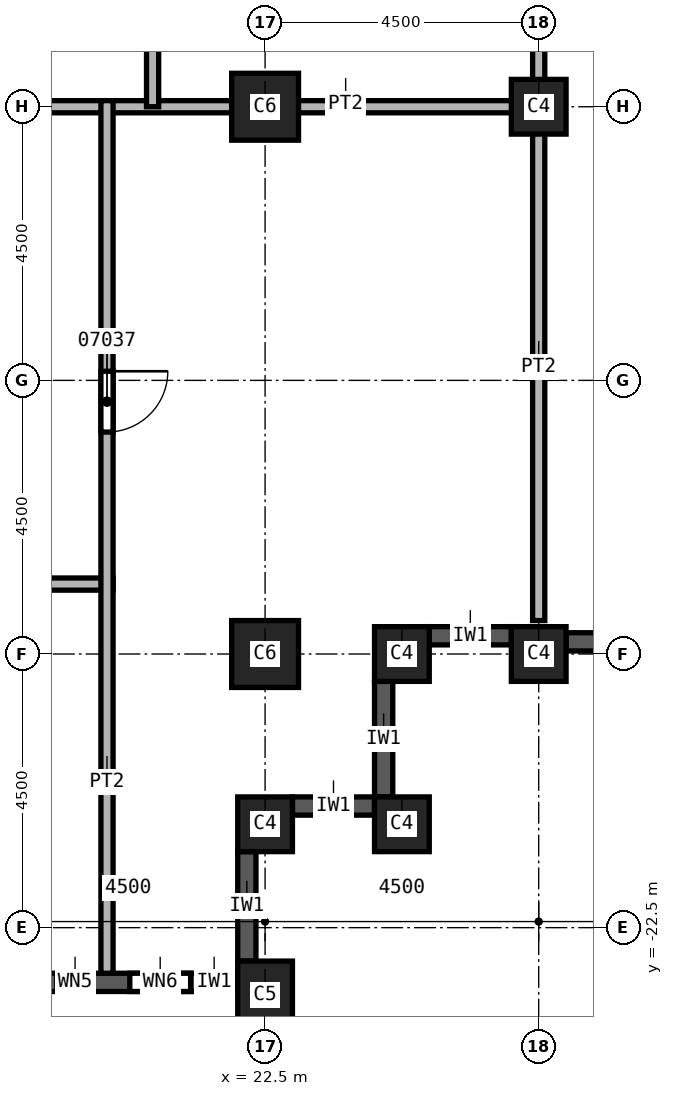
"""IFC4 building model, lengths in metres.
Left out: names, types, materials, properties, quantities, classifications, styles, units other than length and angle.
Written with IfcOpenShell. Run it as: python <this file> out.ifc"""

import sys

from ifc_helpers import new_model, si_unit, direction, frame, frame_2d, origin, origin_2d, place, context, subcontext, project, spatial, rectangle, extrude, element, fill, save


model = new_model("IFC4")
c1 = context("Model", 3, precision=1e-05, world=origin(), true_north=direction((0.0, 1.0)))
c2 = subcontext(c1, "Body", "Model", "MODEL_VIEW")
j1 = project(units=[si_unit("LENGTHUNIT", "METRE"), si_unit("PLANEANGLEUNIT", "RADIAN")], contexts=[c1])
p1 = place(None, origin())
s1 = spatial("IfcSite", under=j1, at=p1, CompositionType="ELEMENT")
p2 = place(p1, origin())
s2 = spatial("IfcBuilding", under=s1, at=p2, CompositionType="ELEMENT")
p3 = place(p2, frame((0.0, 0.0, 138.0)))
s3 = spatial("IfcBuildingStorey", under=s2, at=p3, CompositionType="ELEMENT", Elevation=138.0)
for number, where, z_axis, x_axis in (
    (1, (22.5, -9.0, 0.0), (0.0, 0.0, 1.0), (1.0, 0.0, 0.0)),
    (2, (22.5, -18.0, 0.0), (0.0, 0.0, 1.0), (1.0, 0.0, 0.0)),
):
    element("IfcColumn", number, at=place(p3, frame(where, z_axis=z_axis, x_axis=x_axis)), inside=s3, PredefinedType="COLUMN", context=c2, shape_type="SweptSolid", body=[
        extrude(rectangle(XDim=1.1, YDim=1.1, at=origin_2d()), origin(), (0.0, 0.0, 1.0), 3.7),
    ])
for number, where, z_axis, x_axis in (
    (3, (27.0, -9.0, 0.0), (0.0, 0.0, 1.0), (1.0, 0.0, 0.0)),
    (4, (27.0, -18.0, 0.0), (0.0, 0.0, 1.0), (1.0, 0.0, 0.0)),
):
    element("IfcColumn", number, at=place(p3, frame(where, z_axis=z_axis, x_axis=x_axis)), inside=s3, PredefinedType="COLUMN", context=c2, shape_type="SweptSolid", body=[
        extrude(rectangle(XDim=0.9, YDim=0.9, at=origin_2d()), origin(), (0.0, 0.0, 1.0), 3.7),
    ])
p4 = place(p3, frame((22.5, -23.6, 0.0), z_axis=(0.0, 0.0, 1.0), x_axis=(1.0, 0.0, 0.0)))
e5 = element("IfcColumn", 5, at=p4, inside=s3, PredefinedType="COLUMN", context=c2, shape_type="SweptSolid", body=[
    extrude(rectangle(XDim=0.9, YDim=1.1, at=origin_2d()), origin(), (0.0, 0.0, 1.0), 3.7),
])
for number, where, z_axis, x_axis in (
    (6, (22.5, -20.8, 0.0), (0.0, 0.0, 1.0), (1.0, 0.0, 0.0)),
    (7, (24.75, -20.8, 0.0), (0.0, 0.0, 1.0), (1.0, 0.0, 0.0)),
    (8, (24.75, -18.0, 0.0), (0.0, 0.0, 1.0), (1.0, 0.0, 0.0)),
):
    element("IfcColumn", number, at=place(p3, frame(where, z_axis=z_axis, x_axis=x_axis)), inside=s3, PredefinedType="COLUMN", context=c2, shape_type="SweptSolid", body=[
        extrude(rectangle(XDim=0.9, YDim=0.9, at=origin_2d()), origin(), (0.0, 0.0, 1.0), 3.7),
    ])
p5 = place(p3, frame((18.45, -23.4, 0.0), z_axis=(0.0, 0.0, 1.0), x_axis=(1.0, 0.0, 0.0)))
e9 = element("IfcWall", 9, at=p5, inside=s3, PredefinedType="SOLIDWALL", context=c2, shape_type="SweptSolid", body=[
    extrude(rectangle(XDim=3.6, YDim=0.3, at=frame_2d((1.8, 0.0))), origin(), (0.0, 0.0, 1.0), 3.1),
])
p6 = place(p5, frame((0.625, 0.0, 0.8)))
e10 = element("IfcOpeningElement", 10, at=p6, cuts=e9, PredefinedType="OPENING", context=c2, shape_type="SweptSolid", body=[
    extrude(rectangle(XDim=0.6, YDim=1.95, at=frame_2d((0.3, 0.975))), frame((0.0, 0.15, 0.0), z_axis=(0.0, -1.0, 0.0), x_axis=(1.0, 0.0, 0.0)), (0.0, 0.0, 1.0), 0.3),
])
p7 = place(p5, frame((1.825, 0.0, 0.8)))
e11 = element("IfcOpeningElement", 11, at=p7, cuts=e9, PredefinedType="OPENING", context=c2, shape_type="SweptSolid", body=[
    extrude(rectangle(XDim=1.0, YDim=1.95, at=frame_2d((0.5, 0.975))), frame((0.0, 0.15, 0.0), z_axis=(0.0, -1.0, 0.0), x_axis=(1.0, 0.0, 0.0)), (0.0, 0.0, 1.0), 0.3),
])
p8 = place(p3, frame((22.2, -23.05, 0.0), z_axis=(0.0, 0.0, 1.0), x_axis=(0.0, 1.0, 0.0)))
e12 = element("IfcWall", 12, at=p8, inside=s3, PredefinedType="SOLIDWALL", context=c2, shape_type="SweptSolid", body=[
    extrude(rectangle(XDim=1.8, YDim=0.3, at=frame_2d((0.9, 0.0))), origin(), (0.0, 0.0, 1.0), 3.1),
])
p9 = place(p3, frame((22.95, -20.5, 0.0), z_axis=(0.0, 0.0, 1.0), x_axis=(1.0, 0.0, 0.0)))
e13 = element("IfcWall", 13, at=p9, inside=s3, PredefinedType="SOLIDWALL", context=c2, shape_type="SweptSolid", body=[
    extrude(rectangle(XDim=1.35, YDim=0.3, at=frame_2d((0.675, 0.0))), origin(), (0.0, 0.0, 1.0), 3.1),
])
p10 = place(p3, frame((24.45, -20.35, 0.0), z_axis=(0.0, 0.0, 1.0), x_axis=(0.0, 1.0, 0.0)))
e14 = element("IfcWall", 14, at=p10, inside=s3, PredefinedType="SOLIDWALL", context=c2, shape_type="SweptSolid", body=[
    extrude(rectangle(XDim=1.9, YDim=0.3, at=frame_2d((0.95, 0.0))), origin(), (0.0, 0.0, 1.0), 3.1),
])
p11 = place(p3, frame((25.2, -17.7, 0.0), z_axis=(0.0, 0.0, 1.0), x_axis=(1.0, 0.0, 0.0)))
e15 = element("IfcWall", 15, at=p11, inside=s3, PredefinedType="SOLIDWALL", context=c2, shape_type="SweptSolid", body=[
    extrude(rectangle(XDim=1.35, YDim=0.3, at=frame_2d((0.675, 0.0))), origin(), (0.0, 0.0, 1.0), 3.1),
])
p12 = place(p3, frame((27.45, -17.8, 0.0), z_axis=(0.0, 0.0, 1.0), x_axis=(1.0, 0.0, 0.0)))
e16 = element("IfcWall", 16, at=p12, inside=s3, PredefinedType="SOLIDWALL", context=c2, shape_type="SweptSolid", body=[
    extrude(rectangle(XDim=3.6, YDim=0.3, at=frame_2d((1.8, 0.0))), origin(), (0.0, 0.0, 1.0), 3.1),
])
p13 = place(p12, frame((0.6, 0.0, 0.8)))
e17 = element("IfcOpeningElement", 17, at=p13, cuts=e16, PredefinedType="OPENING", context=c2, shape_type="SweptSolid", body=[
    extrude(rectangle(XDim=2.4, YDim=1.95, at=frame_2d((1.2, 0.975))), frame((0.0, 0.15, 0.0), z_axis=(0.0, -1.0, 0.0), x_axis=(1.0, 0.0, 0.0)), (0.0, 0.0, 1.0), 0.3),
])
p14 = place(p3, frame((15.4, -16.85, 0.0), z_axis=(0.0, 0.0, 1.0), x_axis=(1.0, 0.0, 0.0)))
e18 = element("IfcWall", 18, at=p14, inside=s3, PredefinedType="PARTITIONING", context=c2, shape_type="SweptSolid", body=[
    extrude(rectangle(XDim=4.6, YDim=0.2, at=frame_2d((2.3, 0.0))), origin(), (0.0, 0.0, 1.0), 3.7),
])
p15 = place(p3, frame((15.4, -9.0, 0.0), z_axis=(0.0, 0.0, 1.0), x_axis=(1.0, 0.0, 0.0)))
e19 = element("IfcWall", 19, at=p15, inside=s3, PredefinedType="PARTITIONING", context=c2, shape_type="SweptSolid", body=[
    extrude(rectangle(XDim=11.7, YDim=0.2, at=frame_2d((5.85, 0.0))), origin(), (0.0, 0.0, 1.0), 3.7),
])
p16 = place(p3, frame((19.9, -8.9, 0.0), z_axis=(0.0, 0.0, 1.0), x_axis=(0.0, -1.0, 0.0)))
e20 = element("IfcWall", 20, at=p16, inside=s3, PredefinedType="PARTITIONING", context=c2, shape_type="SweptSolid", body=[
    extrude(rectangle(XDim=14.35, YDim=0.2, at=frame_2d((7.175, 0.0))), origin(), (0.0, 0.0, 1.0), 3.7),
])
p17 = place(p16, frame((4.45, 0.0, 0.0)))
e21 = element("IfcOpeningElement", 21, at=p17, cuts=e20, PredefinedType="OPENING", context=c2, shape_type="SweptSolid", body=[
    extrude(rectangle(XDim=1.0, YDim=2.1, at=frame_2d((0.5, 1.05))), frame((0.0, 0.1, 0.0), z_axis=(0.0, -1.0, 0.0), x_axis=(1.0, 0.0, 0.0)), (0.0, 0.0, 1.0), 0.2),
])
p18 = place(p3, frame((20.65, -3.75, 0.0), z_axis=(0.0, 0.0, 1.0), x_axis=(0.0, -1.0, 0.0)))
e22 = element("IfcWall", 22, at=p18, inside=s3, PredefinedType="PARTITIONING", context=c2, shape_type="SweptSolid", body=[
    extrude(rectangle(XDim=5.25, YDim=0.2, at=frame_2d((2.625, 0.0))), origin(), (0.0, 0.0, 1.0), 3.7),
])
p19 = place(p18, frame((1.3, 0.0, 0.0)))
e23 = element("IfcOpeningElement", 23, at=p19, cuts=e22, PredefinedType="OPENING", context=c2, shape_type="SweptSolid", body=[
    extrude(rectangle(XDim=1.0, YDim=2.1, at=frame_2d((0.5, 1.05))), frame((0.0, 0.1, 0.0), z_axis=(0.0, -1.0, 0.0), x_axis=(1.0, 0.0, 0.0)), (0.0, 0.0, 1.0), 0.2),
])
p20 = place(p3, frame((27.0, -3.75, 0.0), z_axis=(0.0, 0.0, 1.0), x_axis=(0.0, -1.0, 0.0)))
e24 = element("IfcWall", 24, at=p20, inside=s3, PredefinedType="PARTITIONING", context=c2, shape_type="SweptSolid", body=[
    extrude(rectangle(XDim=13.7, YDim=0.2, at=frame_2d((6.85, 0.0))), origin(), (0.0, 0.0, 1.0), 3.7),
])
p21 = place(p17, origin())
e25 = element("IfcDoor", 25, at=p21, inside=s3, OperationType="SINGLE_SWING_RIGHT", PredefinedType="DOOR", context=c2, shape_type="SweptSolid", body=[
    extrude(rectangle(XDim=1.0, YDim=2.1, at=frame_2d((0.5, 1.05))), frame((0.0, 0.025, 0.0), z_axis=(0.0, -1.0, 0.0), x_axis=(1.0, 0.0, 0.0)), (0.0, 0.0, 1.0), 0.05),
])
fill(e21, e25)
p22 = place(p6, origin())
e26 = element("IfcWindow", 26, at=p22, inside=s3, PartitioningType="SINGLE_PANEL", PredefinedType="WINDOW", context=c2, shape_type="SweptSolid", body=[
    extrude(rectangle(XDim=0.6, YDim=1.95, at=frame_2d((0.3, 0.975))), frame((0.0, 0.03, 0.0), z_axis=(0.0, -1.0, 0.0), x_axis=(1.0, 0.0, 0.0)), (0.0, 0.0, 1.0), 0.06),
])
fill(e10, e26)
p23 = place(p7, origin())
e27 = element("IfcWindow", 27, at=p23, inside=s3, PartitioningType="SINGLE_PANEL", PredefinedType="WINDOW", context=c2, shape_type="SweptSolid", body=[
    extrude(rectangle(XDim=1.0, YDim=1.95, at=frame_2d((0.5, 0.975))), frame((0.0, 0.03, 0.0), z_axis=(0.0, -1.0, 0.0), x_axis=(1.0, 0.0, 0.0)), (0.0, 0.0, 1.0), 0.06),
])
fill(e11, e27)
save(model, sys.argv[1])
